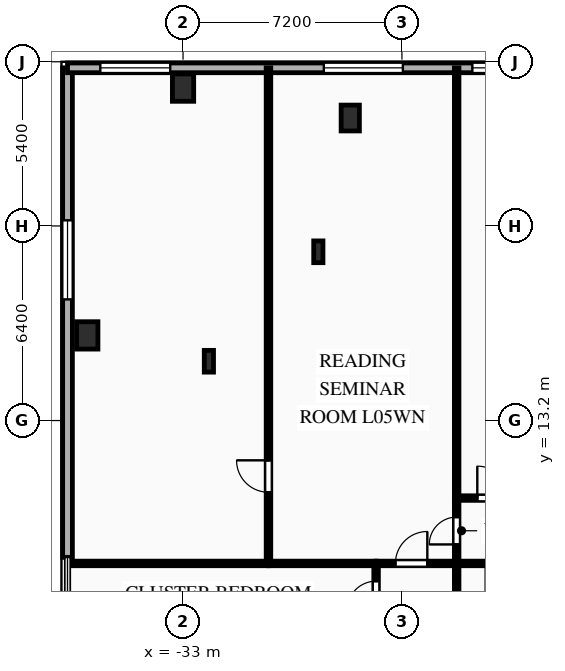
"""IFC4 building model, lengths in metres.
Left out: names, types, materials, properties, quantities, classifications, styles, units other than length and angle.
Written with IfcOpenShell. Run it as: python <this file> out.ifc"""

import sys

from ifc_helpers import new_model, si_unit, direction, frame, frame_2d, origin, origin_2d, place, context, subcontext, project, spatial, rectangle, i_section, extrude, element, fill, save


model = new_model("IFC4")
c1 = context("Model", 3, precision=1e-05, world=origin(), true_north=direction((0.0, 1.0)))
c2 = subcontext(c1, "Body", "Model", "MODEL_VIEW")
j1 = project(units=[si_unit("LENGTHUNIT", "METRE"), si_unit("PLANEANGLEUNIT", "RADIAN")], contexts=[c1])
p1 = place(None, origin())
s1 = spatial("IfcSite", under=j1, at=p1, CompositionType="ELEMENT")
p2 = place(p1, origin())
s2 = spatial("IfcBuilding", under=s1, at=p2, CompositionType="ELEMENT")
p3 = place(p2, frame((0.0, 0.0, 22.5)))
s3 = spatial("IfcBuildingStorey", under=s2, at=p3, CompositionType="ELEMENT", Elevation=22.5)
for number, where, z_axis, x_axis in (
    (1, (-33.0, 24.15, 0.0), (0.0, 0.0, 1.0), (1.0, 0.0, 0.0)),
    (2, (-36.15, 16.0, 0.0), (0.0, 0.0, 1.0), (1.0, 0.0, 0.0)),
):
    element("IfcColumn", number, at=place(p3, frame(where, z_axis=z_axis, x_axis=x_axis)), inside=s3, PredefinedType="COLUMN", context=c2, shape_type="SweptSolid", body=[
        extrude(rectangle(XDim=0.7, YDim=0.9, at=origin_2d()), origin(), (0.0, 0.0, 1.0), 4.5),
    ])
p4 = place(p3, frame((-27.5, 23.15, 0.0), z_axis=(0.0, 0.0, 1.0), x_axis=(1.0, 0.0, 0.0)))
e3 = element("IfcColumn", 3, at=p4, inside=s3, PredefinedType="PILASTER", context=c2, shape_type="SweptSolid", body=[
    extrude(rectangle(XDim=0.6, YDim=0.85, at=origin_2d()), origin(), (0.0, 0.0, 1.0), 4.5),
])
for number, where, z_axis, x_axis in (
    (4, (-28.55, 18.75, 0.0), (0.0, 0.0, 1.0), (1.0, 0.0, 0.0)),
    (5, (-32.15, 15.15, 0.0), (0.0, 0.0, 1.0), (1.0, 0.0, 0.0)),
):
    element("IfcColumn", number, at=place(p3, frame(where, z_axis=z_axis, x_axis=x_axis)), inside=s3, PredefinedType="COLUMN", context=c2, shape_type="SweptSolid", body=[
        extrude(i_section(OverallWidth=0.304, OverallDepth=0.716, WebThickness=0.021, FlangeThickness=0.04, FilletRadius=0.027, at=origin_2d()), origin(), (0.0, 0.0, 1.0), 4.5),
    ])
p5 = place(p3, frame((-36.8, 8.7, 0.0), z_axis=(0.0, 0.0, 1.0), x_axis=(0.0, 1.0, 0.0)))
e6 = element("IfcWall", 6, at=p5, inside=s3, PredefinedType="SOLIDWALL", context=c2, shape_type="SweptSolid", body=[
    extrude(rectangle(XDim=16.1, YDim=0.32, at=frame_2d((8.05, 0.0))), origin(), (0.0, 0.0, 1.0), 4.16),
])
p6 = place(p5, frame((8.485, 0.0, 0.85)))
e7 = element("IfcOpeningElement", 7, at=p6, cuts=e6, PredefinedType="OPENING", context=c2, shape_type="SweptSolid", body=[
    extrude(rectangle(XDim=2.6, YDim=2.4, at=frame_2d((1.3, 1.2))), frame((0.0, 0.17, 0.0), z_axis=(0.0, -1.0, 0.0), x_axis=(1.0, 0.0, 0.0)), (0.0, 0.0, 1.0), 0.34),
])
p7 = place(p3, frame((-36.8, 24.8, 0.0), z_axis=(0.0, 0.0, 1.0), x_axis=(1.0, 0.0, 0.0)))
e8 = element("IfcWall", 8, at=p7, inside=s3, PredefinedType="SOLIDWALL", context=c2, shape_type="SweptSolid", body=[
    extrude(rectangle(XDim=73.6, YDim=0.32, at=frame_2d((36.8, 0.0))), origin(), (0.0, 0.0, 1.0), 4.16),
])
p8 = place(p7, frame((1.079, 0.0, 0.85)))
e9 = element("IfcOpeningElement", 9, at=p8, cuts=e8, PredefinedType="OPENING", context=c2, shape_type="SweptSolid", body=[
    extrude(rectangle(XDim=2.3, YDim=2.4, at=frame_2d((1.15, 1.2))), frame((0.0, 0.17, 0.0), z_axis=(0.0, -1.0, 0.0), x_axis=(1.0, 0.0, 0.0)), (0.0, 0.0, 1.0), 0.34),
])
p9 = place(p7, frame((8.431, 0.0, 0.85)))
e10 = element("IfcOpeningElement", 10, at=p9, cuts=e8, PredefinedType="OPENING", context=c2, shape_type="SweptSolid", body=[
    extrude(rectangle(XDim=2.6, YDim=2.4, at=frame_2d((1.3, 1.2))), frame((0.0, 0.17, 0.0), z_axis=(0.0, -1.0, 0.0), x_axis=(1.0, 0.0, 0.0)), (0.0, 0.0, 1.0), 0.34),
])
p10 = place(p7, frame((13.316, 0.0, 0.85)))
e11 = element("IfcOpeningElement", 11, at=p10, cuts=e8, PredefinedType="OPENING", context=c2, shape_type="SweptSolid", body=[
    extrude(rectangle(XDim=1.1, YDim=1.85, at=frame_2d((0.55, 0.925))), frame((0.0, 0.17, 0.0), z_axis=(0.0, -1.0, 0.0), x_axis=(1.0, 0.0, 0.0)), (0.0, 0.0, 1.0), 0.34),
])
p11 = place(p7, frame((16.339, 0.0, 0.85)))
e12 = element("IfcOpeningElement", 12, at=p11, cuts=e8, PredefinedType="OPENING", context=c2, shape_type="SweptSolid", body=[
    extrude(rectangle(XDim=2.0, YDim=2.4, at=frame_2d((1.0, 1.2))), frame((0.0, 0.17, 0.0), z_axis=(0.0, -1.0, 0.0), x_axis=(1.0, 0.0, 0.0)), (0.0, 0.0, 1.0), 0.34),
])
p12 = place(p7, frame((21.875, 0.0, 0.85)))
e13 = element("IfcOpeningElement", 13, at=p12, cuts=e8, PredefinedType="OPENING", context=c2, shape_type="SweptSolid", body=[
    extrude(rectangle(XDim=2.3, YDim=2.4, at=frame_2d((1.15, 1.2))), frame((0.0, 0.17, 0.0), z_axis=(0.0, -1.0, 0.0), x_axis=(1.0, 0.0, 0.0)), (0.0, 0.0, 1.0), 0.34),
])
p13 = place(p7, frame((26.53, 0.0, 0.85)))
e14 = element("IfcOpeningElement", 14, at=p13, cuts=e8, PredefinedType="OPENING", context=c2, shape_type="SweptSolid", body=[
    extrude(rectangle(XDim=2.6, YDim=2.4, at=frame_2d((1.3, 1.2))), frame((0.0, 0.17, 0.0), z_axis=(0.0, -1.0, 0.0), x_axis=(1.0, 0.0, 0.0)), (0.0, 0.0, 1.0), 0.34),
])
p14 = place(p7, frame((32.537, 0.0, 0.85)))
e15 = element("IfcOpeningElement", 15, at=p14, cuts=e8, PredefinedType="OPENING", context=c2, shape_type="SweptSolid", body=[
    extrude(rectangle(XDim=2.6, YDim=2.4, at=frame_2d((1.3, 1.2))), frame((0.0, 0.17, 0.0), z_axis=(0.0, -1.0, 0.0), x_axis=(1.0, 0.0, 0.0)), (0.0, 0.0, 1.0), 0.34),
])
p15 = place(p7, frame((38.543, 0.0, 0.85)))
e16 = element("IfcOpeningElement", 16, at=p15, cuts=e8, PredefinedType="OPENING", context=c2, shape_type="SweptSolid", body=[
    extrude(rectangle(XDim=2.6, YDim=2.4, at=frame_2d((1.3, 1.2))), frame((0.0, 0.17, 0.0), z_axis=(0.0, -1.0, 0.0), x_axis=(1.0, 0.0, 0.0)), (0.0, 0.0, 1.0), 0.34),
])
p16 = place(p7, frame((44.55, 0.0, 0.85)))
e17 = element("IfcOpeningElement", 17, at=p16, cuts=e8, PredefinedType="OPENING", context=c2, shape_type="SweptSolid", body=[
    extrude(rectangle(XDim=2.6, YDim=2.4, at=frame_2d((1.3, 1.2))), frame((0.0, 0.17, 0.0), z_axis=(0.0, -1.0, 0.0), x_axis=(1.0, 0.0, 0.0)), (0.0, 0.0, 1.0), 0.34),
])
p17 = place(p7, frame((50.556, 0.0, 0.85)))
e18 = element("IfcOpeningElement", 18, at=p17, cuts=e8, PredefinedType="OPENING", context=c2, shape_type="SweptSolid", body=[
    extrude(rectangle(XDim=2.6, YDim=2.4, at=frame_2d((1.3, 1.2))), frame((0.0, 0.17, 0.0), z_axis=(0.0, -1.0, 0.0), x_axis=(1.0, 0.0, 0.0)), (0.0, 0.0, 1.0), 0.34),
])
p18 = place(p7, frame((55.341, 0.0, 0.85)))
e19 = element("IfcOpeningElement", 19, at=p18, cuts=e8, PredefinedType="OPENING", context=c2, shape_type="SweptSolid", body=[
    extrude(rectangle(XDim=2.0, YDim=2.4, at=frame_2d((1.0, 1.2))), frame((0.0, 0.17, 0.0), z_axis=(0.0, -1.0, 0.0), x_axis=(1.0, 0.0, 0.0)), (0.0, 0.0, 1.0), 0.34),
])
p19 = place(p7, frame((59.16, 0.0, 0.85)))
e20 = element("IfcOpeningElement", 20, at=p19, cuts=e8, PredefinedType="OPENING", context=c2, shape_type="SweptSolid", body=[
    extrude(rectangle(XDim=1.1, YDim=1.85, at=frame_2d((0.55, 0.925))), frame((0.0, 0.17, 0.0), z_axis=(0.0, -1.0, 0.0), x_axis=(1.0, 0.0, 0.0)), (0.0, 0.0, 1.0), 0.34),
])
p20 = place(p7, frame((62.649, 0.0, 0.85)))
e21 = element("IfcOpeningElement", 21, at=p20, cuts=e8, PredefinedType="OPENING", context=c2, shape_type="SweptSolid", body=[
    extrude(rectangle(XDim=2.6, YDim=2.4, at=frame_2d((1.3, 1.2))), frame((0.0, 0.17, 0.0), z_axis=(0.0, -1.0, 0.0), x_axis=(1.0, 0.0, 0.0)), (0.0, 0.0, 1.0), 0.34),
])
p21 = place(p7, frame((70.301, 0.0, 0.85)))
e22 = element("IfcOpeningElement", 22, at=p21, cuts=e8, PredefinedType="OPENING", context=c2, shape_type="SweptSolid", body=[
    extrude(rectangle(XDim=2.3, YDim=2.4, at=frame_2d((1.15, 1.2))), frame((0.0, 0.17, 0.0), z_axis=(0.0, -1.0, 0.0), x_axis=(1.0, 0.0, 0.0)), (0.0, 0.0, 1.0), 0.34),
])
p22 = place(p3, frame((-24.0, 8.5, 0.0), z_axis=(0.0, 0.0, 1.0), x_axis=(0.0, 1.0, 0.0)))
e23 = element("IfcWall", 23, at=p22, inside=s3, PredefinedType="PARTITIONING", context=c2, shape_type="SweptSolid", body=[
    extrude(rectangle(XDim=2.15, YDim=0.15, at=frame_2d((1.075, 0.0))), origin(), (0.0, 0.0, 1.0), 4.16),
])
p23 = place(p22, frame((0.625, 0.0, 0.0)))
e24 = element("IfcOpeningElement", 24, at=p23, cuts=e23, PredefinedType="OPENING", context=c2, shape_type="SweptSolid", body=[
    extrude(rectangle(XDim=0.9, YDim=2.1, at=frame_2d((0.45, 1.05))), frame((0.0, 0.085, 0.0), z_axis=(0.0, -1.0, 0.0), x_axis=(1.0, 0.0, 0.0)), (0.0, 0.0, 1.0), 0.17),
])
p24 = place(p3, frame((-18.8, 8.5, 0.0), z_axis=(0.0, 0.0, 1.0), x_axis=(-1.0, 0.0, 0.0)))
e25 = element("IfcWall", 25, at=p24, inside=s3, PredefinedType="PARTITIONING", context=c2, shape_type="SweptSolid", body=[
    extrude(rectangle(XDim=5.2, YDim=0.15, at=frame_2d((2.6, 0.0))), origin(), (0.0, 0.0, 1.0), 4.16),
])
p25 = place(p24, frame((3.196, 0.0, 0.0)))
e26 = element("IfcOpeningElement", 26, at=p25, cuts=e25, PredefinedType="OPENING", context=c2, shape_type="SweptSolid", body=[
    extrude(rectangle(XDim=1.05, YDim=2.15, at=frame_2d((0.525, 1.075))), frame((0.0, 0.085, 0.0), z_axis=(0.0, -1.0, 0.0), x_axis=(1.0, 0.0, 0.0)), (0.0, 0.0, 1.0), 0.17),
])
p26 = place(p3, frame((-24.0, 10.65, 0.0), z_axis=(0.0, 0.0, 1.0), x_axis=(1.0, 0.0, 0.0)))
e27 = element("IfcWall", 27, at=p26, inside=s3, PredefinedType="PARTITIONING", context=c2, shape_type="SweptSolid", body=[
    extrude(rectangle(XDim=3.0, YDim=0.15, at=frame_2d((1.5, 0.0))), origin(), (0.0, 0.0, 1.0), 4.16),
])
p27 = place(p26, frame((0.679, 0.0, 0.0)))
e28 = element("IfcOpeningElement", 28, at=p27, cuts=e27, PredefinedType="OPENING", context=c2, shape_type="SweptSolid", body=[
    extrude(rectangle(XDim=1.05, YDim=2.15, at=frame_2d((0.525, 1.075))), frame((0.0, 0.085, 0.0), z_axis=(0.0, -1.0, 0.0), x_axis=(1.0, 0.0, 0.0)), (0.0, 0.0, 1.0), 0.17),
])
p28 = place(p3, frame((-26.65, 8.5, 0.0), z_axis=(0.0, 0.0, 1.0), x_axis=(1.0, 0.0, 0.0)))
e29 = element("IfcWall", 29, at=p28, inside=s3, PredefinedType="PARTITIONING", context=c2, shape_type="SweptSolid", body=[
    extrude(rectangle(XDim=2.65, YDim=0.15, at=frame_2d((1.325, 0.0))), origin(), (0.0, 0.0, 1.0), 4.16),
])
p29 = place(p28, frame((0.635, 0.0, 0.0)))
e30 = element("IfcOpeningElement", 30, at=p29, cuts=e29, PredefinedType="OPENING", context=c2, shape_type="SweptSolid", body=[
    extrude(rectangle(XDim=1.05, YDim=2.15, at=frame_2d((0.525, 1.075))), frame((0.0, 0.085, 0.0), z_axis=(0.0, -1.0, 0.0), x_axis=(1.0, 0.0, 0.0)), (0.0, 0.0, 1.0), 0.17),
])
p30 = place(p3, frame((-26.65, 6.385, 0.0), z_axis=(0.0, 0.0, 1.0), x_axis=(0.0, 1.0, 0.0)))
e31 = element("IfcWall", 31, at=p30, inside=s3, PredefinedType="PARTITIONING", context=c2, shape_type="SweptSolid", body=[
    extrude(rectangle(XDim=2.115, YDim=0.15, at=frame_2d((1.058, 0.0))), origin(), (0.0, 0.0, 1.0), 4.16),
])
p31 = place(p30, frame((0.583, 0.0, 0.0)))
e32 = element("IfcOpeningElement", 32, at=p31, cuts=e31, PredefinedType="OPENING", context=c2, shape_type="SweptSolid", body=[
    extrude(rectangle(XDim=0.95, YDim=2.1, at=frame_2d((0.475, 1.05))), frame((0.0, 0.085, 0.0), z_axis=(0.0, -1.0, 0.0), x_axis=(1.0, 0.0, 0.0)), (0.0, 0.0, 1.0), 0.17),
])
p32 = place(p3, frame((-24.0, 8.5, 0.0), z_axis=(0.0, 0.0, 1.0), x_axis=(0.0, -1.0, 0.0)))
e33 = element("IfcWall", 33, at=p32, inside=s3, PredefinedType="PARTITIONING", context=c2, shape_type="SweptSolid", body=[
    extrude(rectangle(XDim=14.1, YDim=0.15, at=frame_2d((7.05, 0.0))), origin(), (0.0, 0.0, 1.0), 4.16),
])
p33 = place(p3, frame((-30.19, 8.5, 0.0), z_axis=(0.0, 0.0, 1.0), x_axis=(0.0, 1.0, 0.0)))
e34 = element("IfcWall", 34, at=p33, inside=s3, PredefinedType="PARTITIONING", context=c2, shape_type="SweptSolid", body=[
    extrude(rectangle(XDim=16.3, YDim=0.15, at=frame_2d((8.15, 0.0))), origin(), (0.0, 0.0, 1.0), 4.16),
])
p34 = place(p33, frame((2.341, 0.0, 0.0)))
e35 = element("IfcOpeningElement", 35, at=p34, cuts=e34, PredefinedType="OPENING", context=c2, shape_type="SweptSolid", body=[
    extrude(rectangle(XDim=1.05, YDim=2.15, at=frame_2d((0.525, 1.075))), frame((0.0, 0.085, 0.0), z_axis=(0.0, -1.0, 0.0), x_axis=(1.0, 0.0, 0.0)), (0.0, 0.0, 1.0), 0.17),
])
p35 = place(p3, frame((-26.65, 8.5, 0.0), z_axis=(0.0, 0.0, 1.0), x_axis=(-1.0, 0.0, 0.0)))
e36 = element("IfcWall", 36, at=p35, inside=s3, PredefinedType="PARTITIONING", context=c2, shape_type="SweptSolid", body=[
    extrude(rectangle(XDim=3.54, YDim=0.15, at=frame_2d((1.77, 0.0))), origin(), (0.0, 0.0, 1.0), 4.16),
])
p36 = place(p3, frame((-24.0, 24.8, 0.0), z_axis=(0.0, 0.0, 1.0), x_axis=(0.0, -1.0, 0.0)))
e37 = element("IfcWall", 37, at=p36, inside=s3, PredefinedType="PARTITIONING", context=c2, shape_type="SweptSolid", body=[
    extrude(rectangle(XDim=14.15, YDim=0.15, at=frame_2d((7.075, 0.0))), origin(), (0.0, 0.0, 1.0), 4.16),
])
p37 = place(p3, frame((-30.19, 8.5, 0.0), z_axis=(0.0, 0.0, 1.0), x_axis=(-1.0, 0.0, 0.0)))
e38 = element("IfcWall", 38, at=p37, inside=s3, PredefinedType="PARTITIONING", context=c2, shape_type="SweptSolid", body=[
    extrude(rectangle(XDim=6.61, YDim=0.15, at=frame_2d((3.305, 0.0))), origin(), (0.0, 0.0, 1.0), 4.16),
])
p38 = place(p6, origin())
e39 = element("IfcWindow", 39, at=p38, inside=s3, PartitioningType="SINGLE_PANEL", PredefinedType="WINDOW", context=c2, shape_type="SweptSolid", body=[
    extrude(rectangle(XDim=2.6, YDim=2.4, at=frame_2d((1.3, 1.2))), frame((0.0, 0.03, 0.0), z_axis=(0.0, -1.0, 0.0), x_axis=(1.0, 0.0, 0.0)), (0.0, 0.0, 1.0), 0.06),
])
fill(e7, e39)
p39 = place(p8, origin())
e40 = element("IfcWindow", 40, at=p39, inside=s3, PartitioningType="SINGLE_PANEL", PredefinedType="WINDOW", context=c2, shape_type="SweptSolid", body=[
    extrude(rectangle(XDim=2.3, YDim=2.4, at=frame_2d((1.15, 1.2))), frame((0.0, 0.03, 0.0), z_axis=(0.0, -1.0, 0.0), x_axis=(1.0, 0.0, 0.0)), (0.0, 0.0, 1.0), 0.06),
])
fill(e9, e40)
p40 = place(p9, origin())
e41 = element("IfcWindow", 41, at=p40, inside=s3, PartitioningType="SINGLE_PANEL", PredefinedType="WINDOW", context=c2, shape_type="SweptSolid", body=[
    extrude(rectangle(XDim=2.6, YDim=2.4, at=frame_2d((1.3, 1.2))), frame((0.0, 0.03, 0.0), z_axis=(0.0, -1.0, 0.0), x_axis=(1.0, 0.0, 0.0)), (0.0, 0.0, 1.0), 0.06),
])
fill(e10, e41)
p41 = place(p10, origin())
e42 = element("IfcWindow", 42, at=p41, inside=s3, PartitioningType="SINGLE_PANEL", PredefinedType="WINDOW", context=c2, shape_type="SweptSolid", body=[
    extrude(rectangle(XDim=1.1, YDim=1.85, at=frame_2d((0.55, 0.925))), frame((0.0, 0.03, 0.0), z_axis=(0.0, -1.0, 0.0), x_axis=(1.0, 0.0, 0.0)), (0.0, 0.0, 1.0), 0.06),
])
fill(e11, e42)
p42 = place(p23, origin())
e43 = element("IfcDoor", 43, at=p42, inside=s3, OperationType="SINGLE_SWING_LEFT", PredefinedType="DOOR", context=c2, shape_type="SweptSolid", body=[
    extrude(rectangle(XDim=0.9, YDim=2.1, at=frame_2d((0.45, 1.05))), frame((0.0, 0.025, 0.0), z_axis=(0.0, -1.0, 0.0), x_axis=(1.0, 0.0, 0.0)), (0.0, 0.0, 1.0), 0.05),
])
fill(e24, e43)
p43 = place(p27, origin())
e44 = element("IfcDoor", 44, at=p43, inside=s3, OperationType="SINGLE_SWING_LEFT", PredefinedType="DOOR", context=c2, shape_type="SweptSolid", body=[
    extrude(rectangle(XDim=1.05, YDim=2.15, at=frame_2d((0.525, 1.075))), frame((0.0, 0.025, 0.0), z_axis=(0.0, -1.0, 0.0), x_axis=(1.0, 0.0, 0.0)), (0.0, 0.0, 1.0), 0.05),
])
fill(e28, e44)
p44 = place(p29, origin())
e45 = element("IfcDoor", 45, at=p44, inside=s3, OperationType="SINGLE_SWING_RIGHT", PredefinedType="DOOR", context=c2, shape_type="SweptSolid", body=[
    extrude(rectangle(XDim=1.05, YDim=2.15, at=frame_2d((0.525, 1.075))), frame((0.0, 0.025, 0.0), z_axis=(0.0, -1.0, 0.0), x_axis=(1.0, 0.0, 0.0)), (0.0, 0.0, 1.0), 0.05),
])
fill(e30, e45)
p45 = place(p31, origin())
e46 = element("IfcDoor", 46, at=p45, inside=s3, OperationType="SINGLE_SWING_LEFT", PredefinedType="DOOR", context=c2, shape_type="SweptSolid", body=[
    extrude(rectangle(XDim=0.95, YDim=2.1, at=frame_2d((0.475, 1.05))), frame((0.0, 0.025, 0.0), z_axis=(0.0, -1.0, 0.0), x_axis=(1.0, 0.0, 0.0)), (0.0, 0.0, 1.0), 0.05),
])
fill(e32, e46)
p46 = place(p34, origin())
e47 = element("IfcDoor", 47, at=p46, inside=s3, OperationType="SINGLE_SWING_RIGHT", PredefinedType="DOOR", context=c2, shape_type="SweptSolid", body=[
    extrude(rectangle(XDim=1.05, YDim=2.15, at=frame_2d((0.525, 1.075))), frame((0.0, 0.025, 0.0), z_axis=(0.0, -1.0, 0.0), x_axis=(1.0, 0.0, 0.0)), (0.0, 0.0, 1.0), 0.05),
])
fill(e35, e47)
save(model, sys.argv[1])
